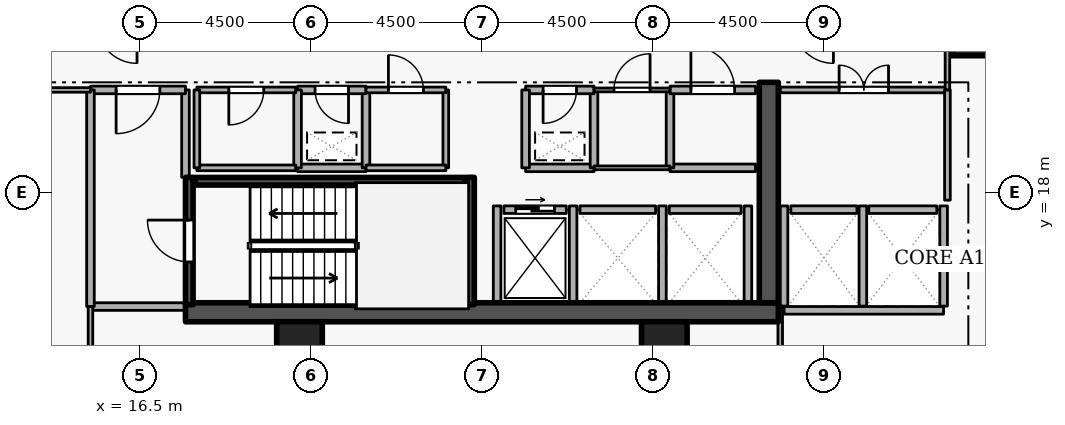
"""IFC4 building model, lengths in metres.
Left out: names, types, materials, properties, quantities, classifications, styles, units other than length and angle.
Written with IfcOpenShell. Run it as: python <this file> out.ifc"""

import sys

from ifc_helpers import new_model, si_unit, direction, frame, frame_2d, origin, origin_2d, place, context, subcontext, project, spatial, rectangle, extrude, element, fill, save


model = new_model("IFC4")
c1 = context("Model", 3, precision=1e-05, world=origin(), true_north=direction((0.0, 1.0)))
c2 = subcontext(c1, "Body", "Model", "MODEL_VIEW")
j1 = project(units=[si_unit("LENGTHUNIT", "METRE"), si_unit("PLANEANGLEUNIT", "RADIAN")], contexts=[c1])
p1 = place(None, origin())
s1 = spatial("IfcSite", under=j1, at=p1, CompositionType="ELEMENT")
p2 = place(p1, origin())
s2 = spatial("IfcBuilding", under=s1, at=p2, CompositionType="ELEMENT")
p3 = place(p2, frame((0.0, 0.0, 119.7)))
s3 = spatial("IfcBuildingStorey", under=s2, at=p3, CompositionType="ELEMENT", Elevation=119.7)
p4 = place(p3, frame((17.7, 14.85, 0.0), z_axis=(0.0, 0.0, 1.0), x_axis=(1.0, 0.0, 0.0)))
e1 = element("IfcWall", 1, at=p4, inside=s3, PredefinedType="SHEAR", context=c2, shape_type="SweptSolid", body=[
    extrude(rectangle(XDim=15.6, YDim=0.5, at=frame_2d((7.8, 0.0))), origin(), (0.0, 0.0, 1.0), 3.6),
])
p5 = place(p3, frame((33.05, 15.1, 0.0), z_axis=(0.0, 0.0, 1.0), x_axis=(0.0, 1.0, 0.0)))
e2 = element("IfcWall", 2, at=p5, inside=s3, PredefinedType="SHEAR", context=c2, shape_type="SweptSolid", body=[
    extrude(rectangle(XDim=5.8, YDim=0.5, at=frame_2d((2.9, 0.0))), origin(), (0.0, 0.0, 1.0), 3.6),
])
for number, where, z_axis, x_axis in (
    (3, (38.5, 22.2, 0.0), (0.0, 0.0, 1.0), (1.0, 0.0, 0.0)),
    (4, (20.7, 14.0, 0.0), (0.0, 0.0, 1.0), (1.0, 0.0, 0.0)),
    (5, (30.3, 14.0, 0.0), (0.0, 0.0, 1.0), (1.0, 0.0, 0.0)),
):
    element("IfcColumn", number, at=place(p3, frame(where, z_axis=z_axis, x_axis=x_axis)), inside=s3, PredefinedType="COLUMN", context=c2, shape_type="SweptSolid", body=[
        extrude(rectangle(XDim=1.2, YDim=1.2, at=origin_2d()), origin(), (0.0, 0.0, 1.0), 3.6),
    ])
p6 = place(p3, frame((26.08, 17.55, 0.0), z_axis=(0.0, 0.0, 1.0), x_axis=(1.0, 0.0, 0.0)))
e6 = element("IfcWall", 6, at=p6, inside=s3, PredefinedType="STANDARD", context=c2, shape_type="SweptSolid", body=[
    extrude(rectangle(XDim=1.64, YDim=0.2, at=frame_2d((0.82, 0.0))), origin(), (0.0, 0.0, 1.0), 3.32),
])
p7 = place(p6, frame((0.31, 0.0, 0.0)))
e7 = element("IfcOpeningElement", 7, at=p7, cuts=e6, PredefinedType="OPENING", context=c2, shape_type="SweptSolid", body=[
    extrude(rectangle(XDim=1.02, YDim=2.06, at=frame_2d((0.51, 1.03))), frame((0.0, 0.11, 0.0), z_axis=(0.0, -1.0, 0.0), x_axis=(1.0, 0.0, 0.0)), (0.0, 0.0, 1.0), 0.22),
])
p8 = place(p3, frame((28.08, 17.55, 0.0), z_axis=(0.0, 0.0, 1.0), x_axis=(1.0, 0.0, 0.0)))
e8 = element("IfcWall", 8, at=p8, inside=s3, PredefinedType="STANDARD", context=c2, shape_type="SweptSolid", body=[
    extrude(rectangle(XDim=1.99, YDim=0.2, at=frame_2d((0.995, 0.0))), origin(), (0.0, 0.0, 1.0), 3.32),
])
p9 = place(p3, frame((30.43, 17.55, 0.0), z_axis=(0.0, 0.0, 1.0), x_axis=(1.0, 0.0, 0.0)))
e9 = element("IfcWall", 9, at=p9, inside=s3, PredefinedType="STANDARD", context=c2, shape_type="SweptSolid", body=[
    extrude(rectangle(XDim=1.89, YDim=0.2, at=frame_2d((0.945, 0.0))), origin(), (0.0, 0.0, 1.0), 3.32),
])
p10 = place(p3, frame((33.63, 17.55, 0.0), z_axis=(0.0, 0.0, 1.0), x_axis=(1.0, 0.0, 0.0)))
e10 = element("IfcWall", 10, at=p10, inside=s3, PredefinedType="STANDARD", context=c2, shape_type="SweptSolid", body=[
    extrude(rectangle(XDim=1.74, YDim=0.2, at=frame_2d((0.87, 0.0))), origin(), (0.0, 0.0, 1.0), 3.32),
])
p11 = place(p3, frame((35.68, 17.55, 0.0), z_axis=(0.0, 0.0, 1.0), x_axis=(1.0, 0.0, 0.0)))
e11 = element("IfcWall", 11, at=p11, inside=s3, PredefinedType="STANDARD", context=c2, shape_type="SweptSolid", body=[
    extrude(rectangle(XDim=1.79, YDim=0.2, at=frame_2d((0.895, 0.0))), origin(), (0.0, 0.0, 1.0), 3.32),
])
for number, where, z_axis, x_axis in (
    (12, (27.9, 15.112, 0.0), (0.0, 0.0, 1.0), (0.0, 1.0, 0.0)),
    (13, (25.9, 15.112, 0.0), (0.0, 0.0, 1.0), (0.0, 1.0, 0.0)),
    (14, (30.25, 15.112, 0.0), (0.0, 0.0, 1.0), (0.0, 1.0, 0.0)),
    (15, (32.5, 15.112, 0.0), (0.0, 0.0, 1.0), (0.0, 1.0, 0.0)),
):
    element("IfcWall", number, at=place(p3, frame(where, z_axis=z_axis, x_axis=x_axis)), inside=s3, PredefinedType="STANDARD", context=c2, shape_type="SweptSolid", body=[
        extrude(rectangle(XDim=2.536, YDim=0.2, at=frame_2d((1.268, 0.0))), origin(), (0.0, 0.0, 1.0), 3.32),
    ])
p12 = place(p3, frame((33.452, 14.9, 0.0), z_axis=(0.0, 0.0, 1.0), x_axis=(1.0, 0.0, 0.0)))
e16 = element("IfcWall", 16, at=p12, inside=s3, PredefinedType="STANDARD", context=c2, shape_type="SweptSolid", body=[
    extrude(rectangle(XDim=4.196, YDim=0.2, at=frame_2d((2.098, 0.0))), origin(), (0.0, 0.0, 1.0), 3.32),
])
p13 = place(p3, frame((35.525, 15.012, 0.0), z_axis=(0.0, 0.0, 1.0), x_axis=(0.0, 1.0, 0.0)))
e17 = element("IfcWall", 17, at=p13, inside=s3, PredefinedType="STANDARD", context=c2, shape_type="SweptSolid", body=[
    extrude(rectangle(XDim=2.636, YDim=0.2, at=frame_2d((1.318, 0.0))), origin(), (0.0, 0.0, 1.0), 3.32),
])
p14 = place(p3, frame((33.45, 15.012, 0.0), z_axis=(0.0, 0.0, 1.0), x_axis=(0.0, 1.0, 0.0)))
e18 = element("IfcWall", 18, at=p14, inside=s3, PredefinedType="STANDARD", context=c2, shape_type="SweptSolid", body=[
    extrude(rectangle(XDim=2.636, YDim=0.2, at=frame_2d((1.318, 0.0))), origin(), (0.0, 0.0, 1.0), 2.525),
])
p15 = place(p3, frame((37.65, 15.012, 0.0), z_axis=(0.0, 0.0, 1.0), x_axis=(0.0, 1.0, 0.0)))
e19 = element("IfcWall", 19, at=p15, inside=s3, PredefinedType="STANDARD", context=c2, shape_type="SweptSolid", body=[
    extrude(rectangle(XDim=2.636, YDim=0.2, at=frame_2d((1.318, 0.0))), origin(), (0.0, 0.0, 1.0), 3.32),
])
p16 = place(p3, frame((17.8, 15.05, 0.0), z_axis=(0.0, 0.0, 1.0), x_axis=(0.0, 1.0, 0.0)))
e20 = element("IfcWall", 20, at=p16, inside=s3, PredefinedType="SHEAR", context=c2, shape_type="SweptSolid", body=[
    extrude(rectangle(XDim=3.35, YDim=0.2, at=frame_2d((1.675, 0.0))), origin(), (0.0, 0.0, 1.0), 3.6),
])
p17 = place(p16, frame((1.125, 0.0, 0.0)))
e21 = element("IfcOpeningElement", 21, at=p17, cuts=e20, PredefinedType="OPENING", context=c2, shape_type="SweptSolid", body=[
    extrude(rectangle(XDim=1.1, YDim=2.1, at=frame_2d((0.55, 1.05))), frame((0.0, 0.11, 0.0), z_axis=(0.0, -1.0, 0.0), x_axis=(1.0, 0.0, 0.0)), (0.0, 0.0, 1.0), 0.22),
])
p18 = place(p3, frame((25.2, 18.4, 0.0), z_axis=(0.0, 0.0, 1.0), x_axis=(0.0, -1.0, 0.0)))
e22 = element("IfcWall", 22, at=p18, inside=s3, PredefinedType="SHEAR", context=c2, shape_type="SweptSolid", body=[
    extrude(rectangle(XDim=3.35, YDim=0.2, at=frame_2d((1.675, 0.0))), origin(), (0.0, 0.0, 1.0), 3.6),
])
p19 = place(p3, frame((25.05, 18.297, 0.0), z_axis=(0.0, 0.0, 1.0), x_axis=(-1.0, 0.0, 0.0)))
e23 = element("IfcWall", 23, at=p19, inside=s3, PredefinedType="SHEAR", context=c2, shape_type="SweptSolid", body=[
    extrude(rectangle(XDim=7.1, YDim=0.2, at=frame_2d((3.55, 0.0))), origin(), (0.0, 0.0, 1.0), 3.6),
])
p20 = place(p3, frame((15.2, 15.0, 0.0), z_axis=(0.0, 0.0, 1.0), x_axis=(1.0, 0.0, 0.0)))
e24 = element("IfcWall", 24, at=p20, inside=s3, PredefinedType="STANDARD", context=c2, shape_type="SweptSolid", body=[
    extrude(rectangle(XDim=2.5, YDim=0.2, at=frame_2d((1.25, 0.0))), origin(), (0.0, 0.0, 1.0), 3.32),
])
p21 = place(p3, frame((17.7, 18.4, 0.0), z_axis=(0.0, 0.0, 1.0), x_axis=(0.0, 1.0, 0.0)))
e25 = element("IfcWall", 25, at=p21, inside=s3, PredefinedType="STANDARD", context=c2, shape_type="SweptSolid", body=[
    extrude(rectangle(XDim=2.3, YDim=0.2, at=frame_2d((1.15, 0.0))), origin(), (0.0, 0.0, 1.0), 2.525),
])
p22 = place(p3, frame((17.7, 20.7, 0.0), z_axis=(0.0, 0.0, 1.0), x_axis=(-1.0, 0.0, 0.0)))
e26 = element("IfcWall", 26, at=p22, inside=s3, PredefinedType="STANDARD", context=c2, shape_type="SweptSolid", body=[
    extrude(rectangle(XDim=2.5, YDim=0.2, at=frame_2d((1.25, 0.0))), origin(), (0.0, 0.0, 1.0), 3.32),
])
p23 = place(p22, frame((0.675, 0.0, 0.0)))
e27 = element("IfcOpeningElement", 27, at=p23, cuts=e26, PredefinedType="OPENING", context=c2, shape_type="SweptSolid", body=[
    extrude(rectangle(XDim=1.15, YDim=2.1, at=frame_2d((0.575, 1.05))), frame((0.0, 0.11, 0.0), z_axis=(0.0, -1.0, 0.0), x_axis=(1.0, 0.0, 0.0)), (0.0, 0.0, 1.0), 0.22),
])
p24 = place(p3, frame((15.2, 20.7, 0.0), z_axis=(0.0, 0.0, 1.0), x_axis=(0.0, -1.0, 0.0)))
e28 = element("IfcWall", 28, at=p24, inside=s3, PredefinedType="STANDARD", context=c2, shape_type="SweptSolid", body=[
    extrude(rectangle(XDim=5.7, YDim=0.2, at=frame_2d((2.85, 0.0))), origin(), (0.0, 0.0, 1.0), 3.32),
])
p25 = place(p3, frame((26.65, 18.65, 0.0), z_axis=(0.0, 0.0, 1.0), x_axis=(1.0, 0.0, 0.0)))
e29 = element("IfcWall", 29, at=p25, inside=s3, PredefinedType="STANDARD", context=c2, shape_type="SweptSolid", body=[
    extrude(rectangle(XDim=1.8, YDim=0.2, at=frame_2d((0.9, 0.0))), origin(), (0.0, 0.0, 1.0), 3.32),
])
p26 = place(p3, frame((28.45, 18.65, 0.0), z_axis=(0.0, 0.0, 1.0), x_axis=(0.0, 1.0, 0.0)))
e30 = element("IfcWall", 30, at=p26, inside=s3, PredefinedType="STANDARD", context=c2, shape_type="SweptSolid", body=[
    extrude(rectangle(XDim=2.05, YDim=0.2, at=frame_2d((1.025, 0.0))), origin(), (0.0, 0.0, 1.0), 3.32),
])
p27 = place(p3, frame((28.45, 20.7, 0.0), z_axis=(0.0, 0.0, 1.0), x_axis=(-1.0, 0.0, 0.0)))
e31 = element("IfcWall", 31, at=p27, inside=s3, PredefinedType="STANDARD", context=c2, shape_type="SweptSolid", body=[
    extrude(rectangle(XDim=1.8, YDim=0.2, at=frame_2d((0.9, 0.0))), origin(), (0.0, 0.0, 1.0), 3.32),
])
p28 = place(p27, frame((0.46, 0.0, 0.0)))
e32 = element("IfcOpeningElement", 32, at=p28, cuts=e31, PredefinedType="OPENING", context=c2, shape_type="SweptSolid", body=[
    extrude(rectangle(XDim=0.88, YDim=2.04, at=frame_2d((0.44, 1.02))), frame((0.0, 0.11, 0.0), z_axis=(0.0, -1.0, 0.0), x_axis=(1.0, 0.0, 0.0)), (0.0, 0.0, 1.0), 0.22),
])
p29 = place(p3, frame((26.65, 20.7, 0.0), z_axis=(0.0, 0.0, 1.0), x_axis=(0.0, -1.0, 0.0)))
e33 = element("IfcWall", 33, at=p29, inside=s3, PredefinedType="STANDARD", context=c2, shape_type="SweptSolid", body=[
    extrude(rectangle(XDim=2.05, YDim=0.2, at=frame_2d((1.025, 0.0))), origin(), (0.0, 0.0, 1.0), 3.32),
])
p30 = place(p3, frame((20.65, 18.65, 0.0), z_axis=(0.0, 0.0, 1.0), x_axis=(1.0, 0.0, 0.0)))
e34 = element("IfcWall", 34, at=p30, inside=s3, PredefinedType="STANDARD", context=c2, shape_type="SweptSolid", body=[
    extrude(rectangle(XDim=1.8, YDim=0.2, at=frame_2d((0.9, 0.0))), origin(), (0.0, 0.0, 1.0), 3.32),
])
p31 = place(p3, frame((22.45, 18.65, 0.0), z_axis=(0.0, 0.0, 1.0), x_axis=(0.0, 1.0, 0.0)))
e35 = element("IfcWall", 35, at=p31, inside=s3, PredefinedType="STANDARD", context=c2, shape_type="SweptSolid", body=[
    extrude(rectangle(XDim=2.05, YDim=0.2, at=frame_2d((1.025, 0.0))), origin(), (0.0, 0.0, 1.0), 3.32),
])
p32 = place(p3, frame((22.45, 20.7, 0.0), z_axis=(0.0, 0.0, 1.0), x_axis=(-1.0, 0.0, 0.0)))
e36 = element("IfcWall", 36, at=p32, inside=s3, PredefinedType="STANDARD", context=c2, shape_type="SweptSolid", body=[
    extrude(rectangle(XDim=1.8, YDim=0.2, at=frame_2d((0.9, 0.0))), origin(), (0.0, 0.0, 1.0), 3.32),
])
p33 = place(p32, frame((0.46, 0.0, 0.0)))
e37 = element("IfcOpeningElement", 37, at=p33, cuts=e36, PredefinedType="OPENING", context=c2, shape_type="SweptSolid", body=[
    extrude(rectangle(XDim=0.88, YDim=2.04, at=frame_2d((0.44, 1.02))), frame((0.0, 0.11, 0.0), z_axis=(0.0, -1.0, 0.0), x_axis=(1.0, 0.0, 0.0)), (0.0, 0.0, 1.0), 0.22),
])
p34 = place(p3, frame((20.65, 20.7, 0.0), z_axis=(0.0, 0.0, 1.0), x_axis=(0.0, -1.0, 0.0)))
e38 = element("IfcWall", 38, at=p34, inside=s3, PredefinedType="STANDARD", context=c2, shape_type="SweptSolid", body=[
    extrude(rectangle(XDim=2.05, YDim=0.2, at=frame_2d((1.025, 0.0))), origin(), (0.0, 0.0, 1.0), 3.32),
])
p35 = place(p3, frame((32.7, 18.65, 0.0), z_axis=(0.0, 0.0, 1.0), x_axis=(-1.0, 0.0, 0.0)))
e39 = element("IfcWall", 39, at=p35, inside=s3, PredefinedType="STANDARD", context=c2, shape_type="SweptSolid", body=[
    extrude(rectangle(XDim=2.25, YDim=0.2, at=frame_2d((1.125, 0.0))), origin(), (0.0, 0.0, 1.0), 3.32),
])
p36 = place(p3, frame((30.45, 18.65, 0.0), z_axis=(0.0, 0.0, 1.0), x_axis=(0.0, 1.0, 0.0)))
e40 = element("IfcWall", 40, at=p36, inside=s3, PredefinedType="STANDARD", context=c2, shape_type="SweptSolid", body=[
    extrude(rectangle(XDim=2.05, YDim=0.2, at=frame_2d((1.025, 0.0))), origin(), (0.0, 0.0, 1.0), 3.32),
])
p37 = place(p3, frame((30.45, 20.7, 0.0), z_axis=(0.0, 0.0, 1.0), x_axis=(1.0, 0.0, 0.0)))
e41 = element("IfcWall", 41, at=p37, inside=s3, PredefinedType="STANDARD", context=c2, shape_type="SweptSolid", body=[
    extrude(rectangle(XDim=2.25, YDim=0.2, at=frame_2d((1.125, 0.0))), origin(), (0.0, 0.0, 1.0), 3.32),
])
p38 = place(p37, frame((0.55, 0.0, 0.0)))
e42 = element("IfcOpeningElement", 42, at=p38, cuts=e41, PredefinedType="OPENING", context=c2, shape_type="SweptSolid", body=[
    extrude(rectangle(XDim=1.15, YDim=2.1, at=frame_2d((0.575, 1.05))), frame((0.0, 0.11, 0.0), z_axis=(0.0, -1.0, 0.0), x_axis=(1.0, 0.0, 0.0)), (0.0, 0.0, 1.0), 0.22),
])
p39 = place(p3, frame((18.0, 18.65, 0.0), z_axis=(0.0, 0.0, 1.0), x_axis=(1.0, 0.0, 0.0)))
e43 = element("IfcWall", 43, at=p39, inside=s3, PredefinedType="PARTITIONING", context=c2, shape_type="SweptSolid", body=[
    extrude(rectangle(XDim=2.6, YDim=0.15, at=frame_2d((1.3, 0.0))), origin(), (0.0, 0.0, 1.0), 3.32),
])
p40 = place(p3, frame((20.6, 20.7, 0.0), z_axis=(0.0, 0.0, 1.0), x_axis=(-1.0, 0.0, 0.0)))
e44 = element("IfcWall", 44, at=p40, inside=s3, PredefinedType="PARTITIONING", context=c2, shape_type="SweptSolid", body=[
    extrude(rectangle(XDim=2.6, YDim=0.15, at=frame_2d((1.3, 0.0))), origin(), (0.0, 0.0, 1.0), 3.32),
])
p41 = place(p40, frame((0.84, 0.0, 0.0)))
e45 = element("IfcOpeningElement", 45, at=p41, cuts=e44, PredefinedType="OPENING", context=c2, shape_type="SweptSolid", body=[
    extrude(rectangle(XDim=0.92, YDim=2.08, at=frame_2d((0.46, 1.04))), frame((0.0, 0.085, 0.0), z_axis=(0.0, -1.0, 0.0), x_axis=(1.0, 0.0, 0.0)), (0.0, 0.0, 1.0), 0.17),
])
p42 = place(p3, frame((18.0, 20.7, 0.0), z_axis=(0.0, 0.0, 1.0), x_axis=(0.0, -1.0, 0.0)))
e46 = element("IfcWall", 46, at=p42, inside=s3, PredefinedType="PARTITIONING", context=c2, shape_type="SweptSolid", body=[
    extrude(rectangle(XDim=2.05, YDim=0.15, at=frame_2d((1.025, 0.0))), origin(), (0.0, 0.0, 1.0), 2.525),
])
p43 = place(p3, frame((24.55, 20.7, 0.0), z_axis=(0.0, 0.0, 1.0), x_axis=(0.0, -1.0, 0.0)))
e47 = element("IfcWall", 47, at=p43, inside=s3, PredefinedType="PARTITIONING", context=c2, shape_type="SweptSolid", body=[
    extrude(rectangle(XDim=2.05, YDim=0.15, at=frame_2d((1.025, 0.0))), origin(), (0.0, 0.0, 1.0), 3.32),
])
p44 = place(p3, frame((24.55, 18.65, 0.0), z_axis=(0.0, 0.0, 1.0), x_axis=(-1.0, 0.0, 0.0)))
e48 = element("IfcWall", 48, at=p44, inside=s3, PredefinedType="PARTITIONING", context=c2, shape_type="SweptSolid", body=[
    extrude(rectangle(XDim=2.1, YDim=0.15, at=frame_2d((1.05, 0.0))), origin(), (0.0, 0.0, 1.0), 3.32),
])
p45 = place(p3, frame((22.45, 20.7, 0.0), z_axis=(0.0, 0.0, 1.0), x_axis=(1.0, 0.0, 0.0)))
e49 = element("IfcWall", 49, at=p45, inside=s3, PredefinedType="PARTITIONING", context=c2, shape_type="SweptSolid", body=[
    extrude(rectangle(XDim=2.1, YDim=0.15, at=frame_2d((1.05, 0.0))), origin(), (0.0, 0.0, 1.0), 3.32),
])
p46 = place(p45, frame((0.59, 0.0, 0.0)))
e50 = element("IfcOpeningElement", 50, at=p46, cuts=e49, PredefinedType="OPENING", context=c2, shape_type="SweptSolid", body=[
    extrude(rectangle(XDim=0.92, YDim=2.08, at=frame_2d((0.46, 1.04))), frame((0.0, 0.085, 0.0), z_axis=(0.0, -1.0, 0.0), x_axis=(1.0, 0.0, 0.0)), (0.0, 0.0, 1.0), 0.17),
])
p47 = place(p3, frame((30.45, 18.65, 0.0), z_axis=(0.0, 0.0, 1.0), x_axis=(-1.0, 0.0, 0.0)))
e51 = element("IfcWall", 51, at=p47, inside=s3, PredefinedType="PARTITIONING", context=c2, shape_type="SweptSolid", body=[
    extrude(rectangle(XDim=2.0, YDim=0.1, at=frame_2d((1.0, 0.0))), origin(), (0.0, 0.0, 1.0), 3.32),
])
p48 = place(p3, frame((28.45, 20.7, 0.0), z_axis=(0.0, 0.0, 1.0), x_axis=(1.0, 0.0, 0.0)))
e52 = element("IfcWall", 52, at=p48, inside=s3, PredefinedType="PARTITIONING", context=c2, shape_type="SweptSolid", body=[
    extrude(rectangle(XDim=2.0, YDim=0.1, at=frame_2d((1.0, 0.0))), origin(), (0.0, 0.0, 1.0), 3.32),
])
p49 = place(p48, frame((0.525, 0.0, 0.0)))
e53 = element("IfcOpeningElement", 53, at=p49, cuts=e52, PredefinedType="OPENING", context=c2, shape_type="SweptSolid", body=[
    extrude(rectangle(XDim=0.95, YDim=2.1, at=frame_2d((0.475, 1.05))), frame((0.0, 0.06, 0.0), z_axis=(0.0, -1.0, 0.0), x_axis=(1.0, 0.0, 0.0)), (0.0, 0.0, 1.0), 0.12),
])
p50 = place(p3, frame((33.35, 20.7, 0.0), z_axis=(0.0, 0.0, 1.0), x_axis=(1.0, 0.0, 0.0)))
e54 = element("IfcWall", 54, at=p50, inside=s3, PredefinedType="PARTITIONING", context=c2, shape_type="SweptSolid", body=[
    extrude(rectangle(XDim=4.4, YDim=0.15, at=frame_2d((2.2, 0.0))), origin(), (0.0, 0.0, 1.0), 3.32),
])
p51 = place(p50, frame((1.55, 0.0, 0.0)))
e55 = element("IfcOpeningElement", 55, at=p51, cuts=e54, PredefinedType="OPENING", context=c2, shape_type="SweptSolid", body=[
    extrude(rectangle(XDim=1.3, YDim=2.12, at=frame_2d((0.65, 1.06))), frame((0.0, 0.085, 0.0), z_axis=(0.0, -1.0, 0.0), x_axis=(1.0, 0.0, 0.0)), (0.0, 0.0, 1.0), 0.17),
])
p52 = place(p3, frame((37.75, 20.7, 0.0), z_axis=(0.0, 0.0, 1.0), x_axis=(0.0, -1.0, 0.0)))
e56 = element("IfcWall", 56, at=p52, inside=s3, PredefinedType="PARTITIONING", context=c2, shape_type="SweptSolid", body=[
    extrude(rectangle(XDim=2.9, YDim=0.15, at=frame_2d((1.45, 0.0))), origin(), (0.0, 0.0, 1.0), 3.32),
])
p53 = place(p3, frame((13.25, 20.7, 0.0), z_axis=(0.0, 0.0, 1.0), x_axis=(1.0, 0.0, 0.0)))
e57 = element("IfcWall", 57, at=p53, inside=s3, PredefinedType="PARTITIONING", context=c2, shape_type="SweptSolid", body=[
    extrude(rectangle(XDim=1.95, YDim=0.12, at=frame_2d((0.975, 0.0))), origin(), (0.0, 0.0, 1.0), 3.32),
])
p54 = place(p3, frame((15.2, 15.0, 0.0), z_axis=(0.0, 0.0, 1.0), x_axis=(0.0, -1.0, 0.0)))
e58 = element("IfcWall", 58, at=p54, inside=s3, PredefinedType="PARTITIONING", context=c2, shape_type="SweptSolid", body=[
    extrude(rectangle(XDim=11.72, YDim=0.12, at=frame_2d((5.86, 0.0))), origin(), (0.0, 0.0, 1.0), 3.32),
])
p55 = place(p3, frame((33.35, 3.28, 0.0), z_axis=(0.0, 0.0, 1.0), x_axis=(0.0, 1.0, 0.0)))
e59 = element("IfcWall", 59, at=p55, inside=s3, PredefinedType="PARTITIONING", context=c2, shape_type="SweptSolid", body=[
    extrude(rectangle(XDim=11.732, YDim=0.12, at=frame_2d((5.866, 0.0))), origin(), (0.0, 0.0, 1.0), 2.525),
])
p56 = place(p3, frame((37.75, 20.7, 0.0), z_axis=(0.0, 0.0, 1.0), x_axis=(0.0, 1.0, 0.0)))
e60 = element("IfcWall", 60, at=p56, inside=s3, PredefinedType="PARTITIONING", context=c2, shape_type="SweptSolid", body=[
    extrude(rectangle(XDim=1.75, YDim=0.12, at=frame_2d((0.875, 0.0))), origin(), (0.0, 0.0, 1.0), 3.32),
])
p57 = place(p7, origin())
e61 = element("IfcDoor", 61, at=p57, inside=s3, OperationType="SLIDING_TO_LEFT", PredefinedType="DOOR", context=c2, shape_type="SweptSolid", body=[
    extrude(rectangle(XDim=1.02, YDim=2.06, at=frame_2d((0.51, 1.03))), frame((0.0, 0.025, 0.0), z_axis=(0.0, -1.0, 0.0), x_axis=(1.0, 0.0, 0.0)), (0.0, 0.0, 1.0), 0.05),
])
fill(e7, e61)
p58 = place(p17, origin())
e62 = element("IfcDoor", 62, at=p58, inside=s3, OperationType="SINGLE_SWING_RIGHT", PredefinedType="DOOR", context=c2, shape_type="SweptSolid", body=[
    extrude(rectangle(XDim=1.1, YDim=2.1, at=frame_2d((0.55, 1.05))), frame((0.0, 0.025, 0.0), z_axis=(0.0, -1.0, 0.0), x_axis=(1.0, 0.0, 0.0)), (0.0, 0.0, 1.0), 0.05),
])
fill(e21, e62)
p59 = place(p23, origin())
e63 = element("IfcDoor", 63, at=p59, inside=s3, OperationType="SINGLE_SWING_RIGHT", PredefinedType="DOOR", context=c2, shape_type="SweptSolid", body=[
    extrude(rectangle(XDim=1.15, YDim=2.1, at=frame_2d((0.575, 1.05))), frame((0.0, 0.025, 0.0), z_axis=(0.0, -1.0, 0.0), x_axis=(1.0, 0.0, 0.0)), (0.0, 0.0, 1.0), 0.05),
])
fill(e27, e63)
p60 = place(p28, origin())
e64 = element("IfcDoor", 64, at=p60, inside=s3, OperationType="SINGLE_SWING_RIGHT", PredefinedType="DOOR", context=c2, shape_type="SweptSolid", body=[
    extrude(rectangle(XDim=0.88, YDim=2.04, at=frame_2d((0.44, 1.02))), frame((0.0, 0.025, 0.0), z_axis=(0.0, -1.0, 0.0), x_axis=(1.0, 0.0, 0.0)), (0.0, 0.0, 1.0), 0.05),
])
fill(e32, e64)
p61 = place(p33, origin())
e65 = element("IfcDoor", 65, at=p61, inside=s3, OperationType="SINGLE_SWING_LEFT", PredefinedType="DOOR", context=c2, shape_type="SweptSolid", body=[
    extrude(rectangle(XDim=0.88, YDim=2.04, at=frame_2d((0.44, 1.02))), frame((0.0, 0.025, 0.0), z_axis=(0.0, -1.0, 0.0), x_axis=(1.0, 0.0, 0.0)), (0.0, 0.0, 1.0), 0.05),
])
fill(e37, e65)
p62 = place(p41, origin())
e66 = element("IfcDoor", 66, at=p62, inside=s3, OperationType="SINGLE_SWING_RIGHT", PredefinedType="DOOR", context=c2, shape_type="SweptSolid", body=[
    extrude(rectangle(XDim=0.92, YDim=2.08, at=frame_2d((0.46, 1.04))), frame((0.0, 0.025, 0.0), z_axis=(0.0, -1.0, 0.0), x_axis=(1.0, 0.0, 0.0)), (0.0, 0.0, 1.0), 0.05),
])
fill(e45, e66)
p63 = place(p46, origin())
e67 = element("IfcDoor", 67, at=p63, inside=s3, OperationType="SINGLE_SWING_LEFT", PredefinedType="DOOR", context=c2, shape_type="SweptSolid", body=[
    extrude(rectangle(XDim=0.92, YDim=2.08, at=frame_2d((0.46, 1.04))), frame((0.0, 0.025, 0.0), z_axis=(0.0, -1.0, 0.0), x_axis=(1.0, 0.0, 0.0)), (0.0, 0.0, 1.0), 0.05),
])
fill(e50, e67)
p64 = place(p49, origin())
e68 = element("IfcDoor", 68, at=p64, inside=s3, OperationType="SINGLE_SWING_RIGHT", PredefinedType="DOOR", context=c2, shape_type="SweptSolid", body=[
    extrude(rectangle(XDim=0.95, YDim=2.1, at=frame_2d((0.475, 1.05))), frame((0.0, 0.025, 0.0), z_axis=(0.0, -1.0, 0.0), x_axis=(1.0, 0.0, 0.0)), (0.0, 0.0, 1.0), 0.05),
])
fill(e53, e68)
p65 = place(p38, origin())
e69 = element("IfcDoor", 69, at=p65, inside=s3, OperationType="SINGLE_SWING_LEFT", PredefinedType="DOOR", context=c2, shape_type="SweptSolid", body=[
    extrude(rectangle(XDim=1.15, YDim=2.1, at=frame_2d((0.575, 1.05))), frame((0.0, 0.025, 0.0), z_axis=(0.0, -1.0, 0.0), x_axis=(1.0, 0.0, 0.0)), (0.0, 0.0, 1.0), 0.05),
])
fill(e42, e69)
p66 = place(p51, origin())
e70 = element("IfcDoor", 70, at=p66, inside=s3, OperationType="DOUBLE_DOOR_SINGLE_SWING", PredefinedType="DOOR", context=c2, shape_type="SweptSolid", body=[
    extrude(rectangle(XDim=1.3, YDim=2.12, at=frame_2d((0.65, 1.06))), frame((0.0, 0.025, 0.0), z_axis=(0.0, -1.0, 0.0), x_axis=(1.0, 0.0, 0.0)), (0.0, 0.0, 1.0), 0.05),
])
fill(e55, e70)
save(model, sys.argv[1])
